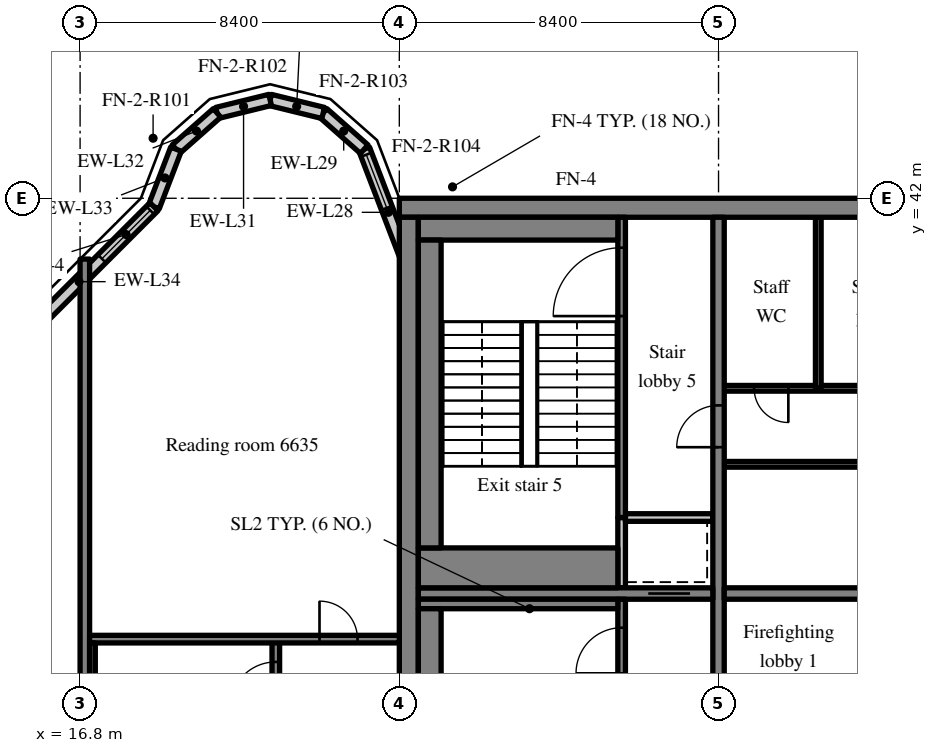
"""IFC4 building model, lengths in metres.
Left out: names, types, materials, properties, quantities, classifications, styles, units other than length and angle.
Written with IfcOpenShell. Run it as: python <this file> out.ifc"""

import sys

from ifc_helpers import new_model, si_unit, direction, frame, frame_2d, origin, place, context, subcontext, project, spatial, rectangle, extrude, source, transform, mapped, element, fill, save


model = new_model("IFC4")
c1 = context("Model", 3, precision=1e-05, world=origin(), true_north=direction((0.0, 1.0)))
c2 = subcontext(c1, "Body", "Model", "MODEL_VIEW")
j1 = project(units=[si_unit("LENGTHUNIT", "METRE"), si_unit("PLANEANGLEUNIT", "RADIAN")], contexts=[c1])
p1 = place(None, origin())
s1 = spatial("IfcSite", under=j1, at=p1, CompositionType="ELEMENT")
p2 = place(p1, origin())
s2 = spatial("IfcBuilding", under=s1, at=p2, CompositionType="ELEMENT")
p3 = place(p2, frame((0.0, 0.0, 277.7)))
s3 = spatial("IfcBuildingStorey", under=s2, at=p3, CompositionType="ELEMENT", Elevation=277.7)
m1 = source(origin(), c2, "Body", "SweptSolid", [
    extrude(rectangle(XDim=50.4, YDim=0.5, at=frame_2d((25.2, 0.0))), origin(), (0.0, 0.0, 1.0), 3.72),
])
p4 = place(p3, frame((25.2, 41.75, 0.0), z_axis=(0.0, 0.0, 1.0), x_axis=(1.0, 0.0, 0.0)))
e1 = element("IfcWall", 1, at=p4, inside=s3, PredefinedType="SHEAR", context=c2, shape_type="MappedRepresentation", body=[
    mapped(m1, transform((0.0, 0.0, 0.0), scale=1.0)),
])
m2 = source(origin(), c2, "Body", "SweptSolid", [
    extrude(rectangle(XDim=19.0, YDim=0.5, at=frame_2d((9.5, 0.0))), origin(), (0.0, 0.0, 1.0), 3.72),
])
p5 = place(p3, frame((25.45, 22.5, 0.0), z_axis=(0.0, 0.0, 1.0), x_axis=(0.0, 1.0, 0.0)))
e2 = element("IfcWall", 2, at=p5, inside=s3, PredefinedType="SHEAR", context=c2, shape_type="MappedRepresentation", body=[
    mapped(m2, transform((0.0, 0.0, 0.0), scale=1.0)),
])
m3 = source(origin(), c2, "Body", "SweptSolid", [
    extrude(rectangle(XDim=19.0, YDim=0.3, at=frame_2d((9.5, 0.0))), origin(), (0.0, 0.0, 1.0), 3.72),
])
p6 = place(p3, frame((33.6, 22.5, 0.0), z_axis=(0.0, 0.0, 1.0), x_axis=(0.0, 1.0, 0.0)))
e3 = element("IfcWall", 3, at=p6, inside=s3, PredefinedType="SHEAR", context=c2, shape_type="MappedRepresentation", body=[
    mapped(m3, transform((0.0, 0.0, 0.0), scale=1.0)),
])
m4 = source(origin(), c2, "Body", "SweptSolid", [
    extrude(rectangle(XDim=1.1, YDim=2.1, at=frame_2d((0.55, 1.05))), frame((0.0, 0.16, 0.0), z_axis=(0.0, -1.0, 0.0), x_axis=(1.0, 0.0, 0.0)), (0.0, 0.0, 1.0), 0.32),
])
p7 = place(p6, frame((12.95, 0.0, 0.0)))
e4 = element("IfcOpeningElement", 4, at=p7, cuts=e3, PredefinedType="OPENING", context=c2, shape_type="MappedRepresentation", body=[
    mapped(m4, transform((0.0, 0.0, 0.0), scale=1.0)),
])
m5 = source(origin(), c2, "Body", "SweptSolid", [
    extrude(rectangle(XDim=7.75, YDim=0.3, at=frame_2d((3.875, 0.0))), origin(), (0.0, 0.0, 1.0), 3.72),
])
p8 = place(p3, frame((25.7, 31.6, 0.0), z_axis=(0.0, 0.0, 1.0), x_axis=(1.0, 0.0, 0.0)))
e5 = element("IfcWall", 5, at=p8, inside=s3, PredefinedType="SHEAR", context=c2, shape_type="MappedRepresentation", body=[
    mapped(m5, transform((0.0, 0.0, 0.0), scale=1.0)),
])
p9 = place(p8, frame((6.05, 0.0, 0.0)))
e6 = element("IfcOpeningElement", 6, at=p9, cuts=e5, PredefinedType="OPENING", context=c2, shape_type="MappedRepresentation", body=[
    mapped(m4, transform((0.0, 0.0, 0.0), scale=1.0)),
])
m6 = source(origin(), c2, "Body", "SweptSolid", [
    extrude(rectangle(XDim=16.5, YDim=0.3, at=frame_2d((8.25, 0.0))), origin(), (0.0, 0.0, 1.0), 3.72),
])
p10 = place(p3, frame((33.75, 31.6, 0.0), z_axis=(0.0, 0.0, 1.0), x_axis=(1.0, 0.0, 0.0)))
e7 = element("IfcWall", 7, at=p10, inside=s3, PredefinedType="SHEAR", context=c2, shape_type="MappedRepresentation", body=[
    mapped(m6, transform((0.0, 0.0, 0.0), scale=1.0)),
])
m7 = source(origin(), c2, "Body", "SweptSolid", [
    extrude(rectangle(XDim=1.0, YDim=2.1, at=frame_2d((0.5, 1.05))), frame((0.0, 0.16, 0.0), z_axis=(0.0, -1.0, 0.0), x_axis=(1.0, 0.0, 0.0)), (0.0, 0.0, 1.0), 0.32),
])
p11 = place(p10, frame((14.875, 0.0, 0.0)))
e8 = element("IfcOpeningElement", 8, at=p11, cuts=e7, PredefinedType="OPENING", context=c2, shape_type="MappedRepresentation", body=[
    mapped(m7, transform((0.0, 0.0, 0.0), scale=1.0)),
])
m8 = source(origin(), c2, "Body", "SweptSolid", [
    extrude(rectangle(XDim=18.4, YDim=0.25, at=frame_2d((9.2, 0.0))), origin(), (0.0, 0.0, 1.0), 3.72),
])
p12 = place(p3, frame((16.925, 22.0, 0.0), z_axis=(0.0, 0.0, 1.0), x_axis=(0.0, 1.0, 0.0)))
e9 = element("IfcWall", 9, at=p12, inside=s3, PredefinedType="SHEAR", context=c2, shape_type="MappedRepresentation", body=[
    mapped(m8, transform((0.0, 0.0, 0.0), scale=1.0)),
])
m9 = source(origin(), c2, "Body", "SweptSolid", [
    extrude(rectangle(XDim=3.559, YDim=0.3, at=frame_2d((1.78, 0.0))), origin(), (0.0, 0.0, 1.0), 3.72),
])
p13 = place(p3, frame((25.55, 39.969, 0.0), z_axis=(0.0, 0.0, 1.0), x_axis=(-0.35779745313, 0.933799219604, 0.0)))
e10 = element("IfcWall", 10, at=p13, inside=s3, PredefinedType="SOLIDWALL", context=c2, shape_type="MappedRepresentation", body=[
    mapped(m9, transform((0.0, 0.0, 0.0), scale=1.0)),
])
m10 = source(origin(), c2, "Body", "SweptSolid", [
    extrude(rectangle(XDim=1.5, YDim=2.0, at=frame_2d((0.75, 1.0))), frame((0.0, 0.16, 0.0), z_axis=(0.0, -1.0, 0.0), x_axis=(1.0, 0.0, 0.0)), (0.0, 0.0, 1.0), 0.32),
])
p14 = place(p13, frame((1.903, 0.0, 0.9)))
e11 = element("IfcOpeningElement", 11, at=p14, cuts=e10, PredefinedType="OPENING", context=c2, shape_type="MappedRepresentation", body=[
    mapped(m10, transform((0.0, 0.0, 0.0), scale=1.0)),
])
m11 = source(origin(), c2, "Body", "SweptSolid", [
    extrude(rectangle(XDim=1.44, YDim=0.3, at=frame_2d((0.72, 0.0))), origin(), (0.0, 0.0, 1.0), 3.72),
])
p15 = place(p3, frame((24.277, 43.292, 0.0), z_axis=(0.0, 0.0, 1.0), x_axis=(-0.749649827867, 0.661834673902, 0.0)))
e12 = element("IfcWall", 12, at=p15, inside=s3, PredefinedType="SOLIDWALL", context=c2, shape_type="MappedRepresentation", body=[
    mapped(m11, transform((0.0, 0.0, 0.0), scale=1.0)),
])
m12 = source(origin(), c2, "Body", "SweptSolid", [
    extrude(rectangle(XDim=1.438, YDim=0.3, at=frame_2d((0.719, 0.0))), origin(), (0.0, 0.0, 1.0), 3.72),
])
p16 = place(p3, frame((23.197, 44.245, 0.0), z_axis=(0.0, 0.0, 1.0), x_axis=(-0.971152283879, 0.238460146601, 0.0)))
e13 = element("IfcWall", 13, at=p16, inside=s3, PredefinedType="SOLIDWALL", context=c2, shape_type="MappedRepresentation", body=[
    mapped(m12, transform((0.0, 0.0, 0.0), scale=1.0)),
])
m13 = source(origin(), c2, "Body", "SweptSolid", [
    extrude(rectangle(XDim=1.439, YDim=0.3, at=frame_2d((0.719, 0.0))), origin(), (0.0, 0.0, 1.0), 3.72),
])
p17 = place(p3, frame((21.8, 44.588, 0.0), z_axis=(0.0, 0.0, 1.0), x_axis=(-0.971161932466, -0.238420848351, 0.0)))
e14 = element("IfcWall", 14, at=p17, inside=s3, PredefinedType="SOLIDWALL", context=c2, shape_type="MappedRepresentation", body=[
    mapped(m13, transform((0.0, 0.0, 0.0), scale=1.0)),
])
m14 = source(origin(), c2, "Body", "SweptSolid", [
    extrude(rectangle(XDim=1.44, YDim=0.3, at=frame_2d((0.72, 0.0))), origin(), (0.0, 0.0, 1.0), 3.72),
])
p18 = place(p3, frame((20.403, 44.245, 0.0), z_axis=(0.0, 0.0, 1.0), x_axis=(-0.74957555648, -0.661918790432, 0.0)))
e15 = element("IfcWall", 15, at=p18, inside=s3, PredefinedType="SOLIDWALL", context=c2, shape_type="MappedRepresentation", body=[
    mapped(m14, transform((0.0, 0.0, 0.0), scale=1.0)),
])
m15 = source(origin(), c2, "Body", "SweptSolid", [
    extrude(rectangle(XDim=1.622, YDim=0.3, at=frame_2d((0.811, 0.0))), origin(), (0.0, 0.0, 1.0), 3.72),
])
p19 = place(p3, frame((19.323, 43.292, 0.0), z_axis=(0.0, 0.0, 1.0), x_axis=(-0.357778527068, -0.933806471154, 0.0)))
e16 = element("IfcWall", 16, at=p19, inside=s3, PredefinedType="SOLIDWALL", context=c2, shape_type="MappedRepresentation", body=[
    mapped(m15, transform((0.0, 0.0, 0.0), scale=1.0)),
])
m16 = source(origin(), c2, "Body", "SweptSolid", [
    extrude(rectangle(XDim=5.576, YDim=0.3, at=frame_2d((2.788, 0.0))), origin(), (0.0, 0.0, 1.0), 3.72),
])
p20 = place(p3, frame((18.743, 41.777, 0.0), z_axis=(0.0, 0.0, 1.0), x_axis=(-0.707106781187, -0.707106781187, 0.0)))
e17 = element("IfcWall", 17, at=p20, inside=s3, PredefinedType="SOLIDWALL", context=c2, shape_type="MappedRepresentation", body=[
    mapped(m16, transform((0.0, 0.0, 0.0), scale=1.0)),
])
m17 = source(origin(), c2, "Body", "SweptSolid", [
    extrude(rectangle(XDim=1.8, YDim=1.5, at=frame_2d((0.9, 0.75))), frame((0.0, 0.16, 0.0), z_axis=(0.0, -1.0, 0.0), x_axis=(1.0, 0.0, 0.0)), (0.0, 0.0, 1.0), 0.32),
])
p21 = place(p20, frame((0.135, 0.0, 0.9)))
e18 = element("IfcOpeningElement", 18, at=p21, cuts=e17, PredefinedType="OPENING", context=c2, shape_type="MappedRepresentation", body=[
    mapped(m17, transform((0.0, 0.0, 0.0), scale=1.0)),
])
m18 = source(origin(), c2, "Body", "SweptSolid", [
    extrude(rectangle(XDim=14.25, YDim=0.15, at=frame_2d((7.125, 0.0))), origin(), (0.0, 0.0, 1.0), 3.72),
])
p22 = place(p3, frame((33.75, 35.0, 0.0), z_axis=(0.0, 0.0, 1.0), x_axis=(1.0, 0.0, 0.0)))
e19 = element("IfcWall", 19, at=p22, inside=s3, PredefinedType="PARTITIONING", context=c2, shape_type="MappedRepresentation", body=[
    mapped(m18, transform((0.0, 0.0, 0.0), scale=1.0)),
])
m19 = source(origin(), c2, "Body", "SweptSolid", [
    extrude(rectangle(XDim=0.9, YDim=2.1, at=frame_2d((0.45, 1.05))), frame((0.0, 0.085, 0.0), z_axis=(0.0, -1.0, 0.0), x_axis=(1.0, 0.0, 0.0)), (0.0, 0.0, 1.0), 0.17),
])
p23 = place(p22, frame((6.637, 0.0, 0.0)))
e20 = element("IfcOpeningElement", 20, at=p23, cuts=e19, PredefinedType="OPENING", context=c2, shape_type="MappedRepresentation", body=[
    mapped(m19, transform((0.0, 0.0, 0.0), scale=1.0)),
])
m20 = source(origin(), c2, "Body", "SweptSolid", [
    extrude(rectangle(XDim=16.5, YDim=0.15, at=frame_2d((8.25, 0.0))), origin(), (0.0, 0.0, 1.0), 3.72),
])
p24 = place(p3, frame((33.75, 37.0, 0.0), z_axis=(0.0, 0.0, 1.0), x_axis=(1.0, 0.0, 0.0)))
e21 = element("IfcWall", 21, at=p24, inside=s3, PredefinedType="PARTITIONING", context=c2, shape_type="MappedRepresentation", body=[
    mapped(m20, transform((0.0, 0.0, 0.0), scale=1.0)),
])
p25 = place(p24, frame((0.787, 0.0, 0.0)))
e22 = element("IfcOpeningElement", 22, at=p25, cuts=e21, PredefinedType="OPENING", context=c2, shape_type="MappedRepresentation", body=[
    mapped(m19, transform((0.0, 0.0, 0.0), scale=1.0)),
])
p26 = place(p24, frame((3.675, 0.0, 0.0)))
e23 = element("IfcOpeningElement", 23, at=p26, cuts=e21, PredefinedType="OPENING", context=c2, shape_type="MappedRepresentation", body=[
    mapped(m19, transform((0.0, 0.0, 0.0), scale=1.0)),
])
p27 = place(p24, frame((9.45, 0.0, 0.0)))
e24 = element("IfcOpeningElement", 24, at=p27, cuts=e21, PredefinedType="OPENING", context=c2, shape_type="MappedRepresentation", body=[
    mapped(m19, transform((0.0, 0.0, 0.0), scale=1.0)),
])
p28 = place(p24, frame((14.813, 0.0, 0.0)))
e25 = element("IfcOpeningElement", 25, at=p28, cuts=e21, PredefinedType="OPENING", context=c2, shape_type="MappedRepresentation", body=[
    mapped(m19, transform((0.0, 0.0, 0.0), scale=1.0)),
])
m21 = source(origin(), c2, "Body", "SweptSolid", [
    extrude(rectangle(XDim=4.5, YDim=0.15, at=frame_2d((2.25, 0.0))), origin(), (0.0, 0.0, 1.0), 3.72),
])
p29 = place(p3, frame((36.225, 37.0, 0.0), z_axis=(0.0, 0.0, 1.0), x_axis=(0.0, 1.0, 0.0)))
e26 = element("IfcWall", 26, at=p29, inside=s3, PredefinedType="PARTITIONING", context=c2, shape_type="MappedRepresentation", body=[
    mapped(m21, transform((0.0, 0.0, 0.0), scale=1.0)),
])
m22 = source(origin(), c2, "Body", "SweptSolid", [
    extrude(rectangle(XDim=8.95, YDim=0.2, at=frame_2d((4.475, 0.0))), origin(), (0.0, 0.0, 1.0), 3.72),
])
p30 = place(p3, frame((31.05, 22.5, 0.0), z_axis=(0.0, 0.0, 1.0), x_axis=(0.0, 1.0, 0.0)))
e27 = element("IfcWall", 27, at=p30, inside=s3, PredefinedType="SOLIDWALL", context=c2, shape_type="MappedRepresentation", body=[
    mapped(m22, transform((0.0, 0.0, 0.0), scale=1.0)),
])
m23 = source(origin(), c2, "Body", "SweptSolid", [
    extrude(rectangle(XDim=1.2, YDim=2.1, at=frame_2d((0.6, 1.05))), frame((0.0, 0.11, 0.0), z_axis=(0.0, -1.0, 0.0), x_axis=(1.0, 0.0, 0.0)), (0.0, 0.0, 1.0), 0.22),
])
p31 = place(p30, frame((7.0, 0.0, 0.0)))
e28 = element("IfcOpeningElement", 28, at=p31, cuts=e27, PredefinedType="OPENING", context=c2, shape_type="MappedRepresentation", body=[
    mapped(m23, transform((0.0, 0.0, 0.0), scale=1.0)),
])
m24 = source(origin(), c2, "Body", "SweptSolid", [
    extrude(rectangle(XDim=1.85, YDim=0.2, at=frame_2d((0.925, 0.0))), origin(), (0.0, 0.0, 1.0), 3.72),
])
p32 = place(p3, frame((31.05, 31.75, 0.0), z_axis=(0.0, 0.0, 1.0), x_axis=(0.0, 1.0, 0.0)))
e29 = element("IfcWall", 29, at=p32, inside=s3, PredefinedType="SOLIDWALL", context=c2, shape_type="MappedRepresentation", body=[
    mapped(m24, transform((0.0, 0.0, 0.0), scale=1.0)),
])
m25 = source(origin(), c2, "Body", "SweptSolid", [
    extrude(rectangle(XDim=2.3, YDim=0.2, at=frame_2d((1.15, 0.0))), origin(), (0.0, 0.0, 1.0), 3.72),
])
p33 = place(p3, frame((31.15, 33.6, 0.0), z_axis=(0.0, 0.0, 1.0), x_axis=(1.0, 0.0, 0.0)))
e30 = element("IfcWall", 30, at=p33, inside=s3, PredefinedType="SOLIDWALL", context=c2, shape_type="MappedRepresentation", body=[
    mapped(m25, transform((0.0, 0.0, 0.0), scale=1.0)),
])
m26 = source(origin(), c2, "Body", "SweptSolid", [
    extrude(rectangle(XDim=7.9, YDim=0.2, at=frame_2d((3.95, 0.0))), origin(), (0.0, 0.0, 1.0), 3.72),
])
p34 = place(p3, frame((31.05, 33.6, 0.0), z_axis=(0.0, 0.0, 1.0), x_axis=(0.0, 1.0, 0.0)))
e31 = element("IfcWall", 31, at=p34, inside=s3, PredefinedType="SOLIDWALL", context=c2, shape_type="MappedRepresentation", body=[
    mapped(m26, transform((0.0, 0.0, 0.0), scale=1.0)),
])
m27 = source(origin(), c2, "Body", "SweptSolid", [
    extrude(rectangle(XDim=1.8, YDim=2.1, at=frame_2d((0.9, 1.05))), frame((0.0, 0.11, 0.0), z_axis=(0.0, -1.0, 0.0), x_axis=(1.0, 0.0, 0.0)), (0.0, 0.0, 1.0), 0.22),
])
p35 = place(p34, frame((5.3, 0.0, 0.0)))
e32 = element("IfcOpeningElement", 32, at=p35, cuts=e31, PredefinedType="OPENING", context=c2, shape_type="MappedRepresentation", body=[
    mapped(m27, transform((0.0, 0.0, 0.0), scale=1.0)),
])
m28 = source(origin(), c2, "Body", "SweptSolid", [
    extrude(rectangle(XDim=8.3, YDim=0.2, at=frame_2d((4.15, 0.0))), origin(), (0.0, 0.0, 1.0), 3.72),
])
p36 = place(p3, frame((21.95, 22.1, 0.0), z_axis=(0.0, 0.0, 1.0), x_axis=(0.0, 1.0, 0.0)))
e33 = element("IfcWall", 33, at=p36, inside=s3, PredefinedType="SOLIDWALL", context=c2, shape_type="MappedRepresentation", body=[
    mapped(m28, transform((0.0, 0.0, 0.0), scale=1.0)),
])
p37 = place(p36, frame((6.5, 0.0, 0.0)))
e34 = element("IfcOpeningElement", 34, at=p37, cuts=e33, PredefinedType="OPENING", context=c2, shape_type="MappedRepresentation", body=[
    mapped(m23, transform((0.0, 0.0, 0.0), scale=1.0)),
])
m29 = source(origin(), c2, "Body", "SweptSolid", [
    extrude(rectangle(XDim=8.15, YDim=0.2, at=frame_2d((4.075, 0.0))), origin(), (0.0, 0.0, 1.0), 3.72),
])
p38 = place(p3, frame((17.05, 30.4, 0.0), z_axis=(0.0, 0.0, 1.0), x_axis=(1.0, 0.0, 0.0)))
e35 = element("IfcWall", 35, at=p38, inside=s3, PredefinedType="SOLIDWALL", context=c2, shape_type="MappedRepresentation", body=[
    mapped(m29, transform((0.0, 0.0, 0.0), scale=1.0)),
])
m30 = source(origin(), c2, "Body", "SweptSolid", [
    extrude(rectangle(XDim=1.0, YDim=2.1, at=frame_2d((0.5, 1.05))), frame((0.0, 0.11, 0.0), z_axis=(0.0, -1.0, 0.0), x_axis=(1.0, 0.0, 0.0)), (0.0, 0.0, 1.0), 0.22),
])
p39 = place(p38, frame((6.05, 0.0, 0.0)))
e36 = element("IfcOpeningElement", 36, at=p39, cuts=e35, PredefinedType="OPENING", context=c2, shape_type="MappedRepresentation", body=[
    mapped(m30, transform((0.0, 0.0, 0.0), scale=1.0)),
])
m31 = source(origin(), c2, "Body", "SweptSolid", [
    extrude(rectangle(XDim=5.25, YDim=0.25, at=frame_2d((2.625, 0.0))), origin(), (0.0, 0.0, 1.0), 3.72),
])
p40 = place(p3, frame((25.7, 31.325, 0.0), z_axis=(0.0, 0.0, 1.0), x_axis=(1.0, 0.0, 0.0)))
e37 = element("IfcWall", 37, at=p40, inside=s3, PredefinedType="SOLIDWALL", context=c2, shape_type="MappedRepresentation", body=[
    mapped(m31, transform((0.0, 0.0, 0.0), scale=1.0)),
])
m32 = source(origin(), c2, "Body", "SweptSolid", [
    extrude(rectangle(XDim=8.1, YDim=0.6, at=frame_2d((4.05, 0.0))), origin(), (0.0, 0.0, 1.0), 3.72),
])
p41 = place(p3, frame((26.0, 23.1, 0.0), z_axis=(0.0, 0.0, 1.0), x_axis=(0.0, 1.0, 0.0)))
e38 = element("IfcWall", 38, at=p41, inside=s3, PredefinedType="SOLIDWALL", context=c2, shape_type="MappedRepresentation", body=[
    mapped(m32, transform((0.0, 0.0, 0.0), scale=1.0)),
])
m33 = source(origin(), c2, "Body", "SweptSolid", [
    extrude(rectangle(XDim=8.1, YDim=0.15, at=frame_2d((4.05, 0.0))), origin(), (0.0, 0.0, 1.0), 3.72),
])
p42 = place(p3, frame((17.125, 22.2, 0.0), z_axis=(0.0, 0.0, 1.0), x_axis=(0.0, 1.0, 0.0)))
e39 = element("IfcWall", 39, at=p42, inside=s3, PredefinedType="SOLIDWALL", context=c2, shape_type="MappedRepresentation", body=[
    mapped(m33, transform((0.0, 0.0, 0.0), scale=1.0)),
])
m34 = source(origin(), c2, "Body", "SweptSolid", [
    extrude(rectangle(XDim=5.25, YDim=0.6, at=frame_2d((2.625, 0.0))), origin(), (0.0, 0.0, 1.0), 3.72),
])
p43 = place(p3, frame((25.7, 41.2, 0.0), z_axis=(0.0, 0.0, 1.0), x_axis=(1.0, 0.0, 0.0)))
e40 = element("IfcWall", 40, at=p43, inside=s3, PredefinedType="SOLIDWALL", context=c2, shape_type="MappedRepresentation", body=[
    mapped(m34, transform((0.0, 0.0, 0.0), scale=1.0)),
])
m35 = source(origin(), c2, "Body", "SweptSolid", [
    extrude(rectangle(XDim=5.25, YDim=1.05, at=frame_2d((2.625, 0.0))), origin(), (0.0, 0.0, 1.0), 3.72),
])
p44 = place(p3, frame((25.7, 32.275, 0.0), z_axis=(0.0, 0.0, 1.0), x_axis=(1.0, 0.0, 0.0)))
e41 = element("IfcWall", 41, at=p44, inside=s3, PredefinedType="SOLIDWALL", context=c2, shape_type="MappedRepresentation", body=[
    mapped(m35, transform((0.0, 0.0, 0.0), scale=1.0)),
])
p45 = place(p3, frame((26.0, 32.8, 0.0), z_axis=(0.0, 0.0, 1.0), x_axis=(0.0, 1.0, 0.0)))
e42 = element("IfcWall", 42, at=p45, inside=s3, PredefinedType="SOLIDWALL", context=c2, shape_type="MappedRepresentation", body=[
    mapped(m32, transform((0.0, 0.0, 0.0), scale=1.0)),
])
m36 = source(origin(), c2, "Body", "SweptSolid", [
    extrude(rectangle(XDim=1.5, YDim=2.0, at=frame_2d((0.75, 1.0))), frame((0.0, 0.03, 0.0), z_axis=(0.0, -1.0, 0.0), x_axis=(1.0, 0.0, 0.0)), (0.0, 0.0, 1.0), 0.06),
])
p46 = place(p14, origin())
e43 = element("IfcWindow", 43, at=p46, inside=s3, PartitioningType="SINGLE_PANEL", PredefinedType="WINDOW", context=c2, shape_type="MappedRepresentation", body=[
    mapped(m36, transform((0.0, 0.0, 0.0), scale=1.0)),
])
fill(e11, e43)
m37 = source(origin(), c2, "Body", "SweptSolid", [
    extrude(rectangle(XDim=1.8, YDim=1.5, at=frame_2d((0.9, 0.75))), frame((0.0, 0.03, 0.0), z_axis=(0.0, -1.0, 0.0), x_axis=(1.0, 0.0, 0.0)), (0.0, 0.0, 1.0), 0.06),
])
p47 = place(p21, origin())
e44 = element("IfcWindow", 44, at=p47, inside=s3, PartitioningType="SINGLE_PANEL", PredefinedType="WINDOW", context=c2, shape_type="MappedRepresentation", body=[
    mapped(m37, transform((0.0, 0.0, 0.0), scale=1.0)),
])
fill(e18, e44)
m38 = source(origin(), c2, "Body", "SweptSolid", [
    extrude(rectangle(XDim=0.9, YDim=2.1, at=frame_2d((0.45, 1.05))), frame((0.0, 0.025, 0.0), z_axis=(0.0, -1.0, 0.0), x_axis=(1.0, 0.0, 0.0)), (0.0, 0.0, 1.0), 0.05),
])
p48 = place(p25, origin())
e45 = element("IfcDoor", 45, at=p48, inside=s3, OperationType="SINGLE_SWING_RIGHT", PredefinedType="DOOR", context=c2, shape_type="MappedRepresentation", body=[
    mapped(m38, transform((0.0, 0.0, 0.0), scale=1.0)),
])
fill(e22, e45)
m39 = source(origin(), c2, "Body", "SweptSolid", [
    extrude(rectangle(XDim=1.2, YDim=2.1, at=frame_2d((0.6, 1.05))), frame((0.0, 0.025, 0.0), z_axis=(0.0, -1.0, 0.0), x_axis=(1.0, 0.0, 0.0)), (0.0, 0.0, 1.0), 0.05),
])
p49 = place(p31, origin())
e46 = element("IfcDoor", 46, at=p49, inside=s3, OperationType="SINGLE_SWING_LEFT", PredefinedType="DOOR", context=c2, shape_type="MappedRepresentation", body=[
    mapped(m39, transform((0.0, 0.0, 0.0), scale=1.0)),
])
fill(e28, e46)
m40 = source(origin(), c2, "Body", "SweptSolid", [
    extrude(rectangle(XDim=1.1, YDim=2.1, at=frame_2d((0.55, 1.05))), frame((0.0, 0.025, 0.0), z_axis=(0.0, -1.0, 0.0), x_axis=(1.0, 0.0, 0.0)), (0.0, 0.0, 1.0), 0.05),
])
p50 = place(p9, origin())
e47 = element("IfcDoor", 47, at=p50, inside=s3, OperationType="SLIDING_TO_RIGHT", PredefinedType="DOOR", context=c2, shape_type="MappedRepresentation", body=[
    mapped(m40, transform((0.0, 0.0, 0.0), scale=1.0)),
])
fill(e6, e47)
m41 = source(origin(), c2, "Body", "SweptSolid", [
    extrude(rectangle(XDim=1.8, YDim=2.1, at=frame_2d((0.9, 1.05))), frame((0.0, 0.025, 0.0), z_axis=(0.0, -1.0, 0.0), x_axis=(1.0, 0.0, 0.0)), (0.0, 0.0, 1.0), 0.05),
])
p51 = place(p35, origin())
e48 = element("IfcDoor", 48, at=p51, inside=s3, OperationType="SINGLE_SWING_LEFT", PredefinedType="DOOR", context=c2, shape_type="MappedRepresentation", body=[
    mapped(m41, transform((0.0, 0.0, 0.0), scale=1.0)),
])
fill(e32, e48)
p52 = place(p37, origin())
e49 = element("IfcDoor", 49, at=p52, inside=s3, OperationType="SINGLE_SWING_LEFT", PredefinedType="DOOR", context=c2, shape_type="MappedRepresentation", body=[
    mapped(m39, transform((0.0, 0.0, 0.0), scale=1.0)),
])
fill(e34, e49)
m42 = source(origin(), c2, "Body", "SweptSolid", [
    extrude(rectangle(XDim=1.0, YDim=2.1, at=frame_2d((0.5, 1.05))), frame((0.0, 0.025, 0.0), z_axis=(0.0, -1.0, 0.0), x_axis=(1.0, 0.0, 0.0)), (0.0, 0.0, 1.0), 0.05),
])
p53 = place(p39, origin())
e50 = element("IfcDoor", 50, at=p53, inside=s3, OperationType="SINGLE_SWING_LEFT", PredefinedType="DOOR", context=c2, shape_type="MappedRepresentation", body=[
    mapped(m42, transform((0.0, 0.0, 0.0), scale=1.0)),
])
fill(e36, e50)
p54 = place(p7, origin())
e51 = element("IfcDoor", 51, at=p54, inside=s3, OperationType="SINGLE_SWING_LEFT", PredefinedType="DOOR", context=c2, shape_type="MappedRepresentation", body=[
    mapped(m40, transform((0.0, 0.0, 0.0), scale=1.0)),
])
fill(e4, e51)
save(model, sys.argv[1])
